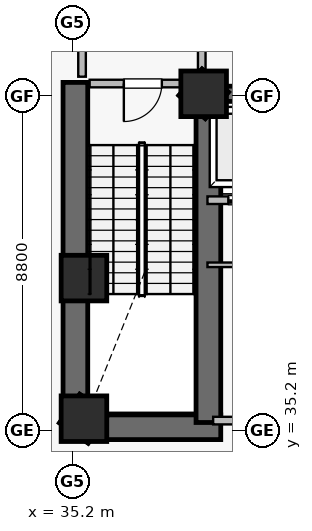
"""IFC4 building model, lengths in metres.
Left out: names, types, materials, properties, quantities, classifications, styles, units other than length and angle.
Written with IfcOpenShell. Run it as: python <this file> out.ifc"""

import sys

from ifc_helpers import new_model, si_unit, direction, frame, frame_2d, origin, origin_2d, place, context, subcontext, project, spatial, rectangle, extrude, element, fill, save


model = new_model("IFC4")
c1 = context("Model", 3, precision=1e-05, world=origin(), true_north=direction((0.0, 1.0)))
c2 = subcontext(c1, "Body", "Model", "MODEL_VIEW")
j1 = project(units=[si_unit("LENGTHUNIT", "METRE"), si_unit("PLANEANGLEUNIT", "RADIAN")], contexts=[c1])
p1 = place(None, origin())
s1 = spatial("IfcSite", under=j1, at=p1, CompositionType="ELEMENT")
p2 = place(p1, origin())
s2 = spatial("IfcBuilding", under=s1, at=p2, CompositionType="ELEMENT")
p3 = place(p2, frame((0.0, 0.0, 90.4)))
s3 = spatial("IfcBuildingStorey", under=s2, at=p3, CompositionType="ELEMENT", Elevation=90.4)
p4 = place(p3, frame((34.95, 35.275, 0.0), z_axis=(0.0, 0.0, 1.0), x_axis=(1.0, 0.0, 0.0)))
e1 = element("IfcWall", 1, at=p4, inside=s3, PredefinedType="SHEAR", context=c2, shape_type="SweptSolid", body=[
    extrude(rectangle(XDim=4.15, YDim=0.65, at=frame_2d((2.075, 0.0))), origin(), (0.0, 0.0, 1.0), 5.1),
])
p5 = place(p3, frame((35.275, 34.95, 0.0), z_axis=(0.0, 0.0, 1.0), x_axis=(0.0, 1.0, 0.0)))
e2 = element("IfcWall", 2, at=p5, inside=s3, PredefinedType="SHEAR", context=c2, shape_type="SweptSolid", body=[
    extrude(rectangle(XDim=9.4, YDim=0.65, at=frame_2d((4.7, 0.0))), origin(), (0.0, 0.0, 1.0), 5.1),
])
p6 = place(p3, frame((38.775, 35.4, 0.0), z_axis=(0.0, 0.0, 1.0), x_axis=(0.0, 1.0, 0.0)))
e3 = element("IfcWall", 3, at=p6, inside=s3, PredefinedType="SHEAR", context=c2, shape_type="SweptSolid", body=[
    extrude(rectangle(XDim=8.95, YDim=0.65, at=frame_2d((4.475, 0.0))), origin(), (0.0, 0.0, 1.0), 5.1),
])
p7 = place(p3, frame((38.75, 44.05, 0.0), z_axis=(0.0, 0.0, 1.0), x_axis=(1.0, 0.0, 0.0)))
e4 = element("IfcWall", 4, at=p7, inside=s3, PredefinedType="SHEAR", context=c2, shape_type="SweptSolid", body=[
    extrude(rectangle(XDim=4.2, YDim=0.4, at=frame_2d((2.1, 0.0))), origin(), (0.0, 0.0, 1.0), 5.1),
])
for number, where, z_axis, x_axis in (
    (5, (35.5, 35.5, 0.0), (0.0, 0.0, 1.0), (1.0, 0.0, 0.0)),
    (6, (38.65, 44.05, 0.0), (0.0, 0.0, 1.0), (1.0, 0.0, 0.0)),
    (7, (35.5, 39.2, 0.0), (0.0, 0.0, 1.0), (1.0, 0.0, 0.0)),
):
    element("IfcColumn", number, at=place(p3, frame(where, z_axis=z_axis, x_axis=x_axis)), inside=s3, PredefinedType="COLUMN", context=c2, shape_type="SweptSolid", body=[
        extrude(rectangle(XDim=1.2, YDim=1.2, at=origin_2d()), origin(), (0.0, 0.0, 1.0), 5.4),
    ])
p8 = place(p3, frame((38.9, 35.45, 0.0), z_axis=(0.0, 0.0, 1.0), x_axis=(1.0, 0.0, 0.0)))
e8 = element("IfcWall", 8, at=p8, inside=s3, PredefinedType="SOLIDWALL", context=c2, shape_type="SweptSolid", body=[
    extrude(rectangle(XDim=10.2, YDim=0.2, at=frame_2d((5.1, 0.0))), origin(), (0.0, 0.0, 1.0), 5.1),
])
p9 = place(p8, frame((4.6, 0.0, 0.0)))
e9 = element("IfcOpeningElement", 9, at=p9, cuts=e8, PredefinedType="OPENING", context=c2, shape_type="SweptSolid", body=[
    extrude(rectangle(XDim=1.0, YDim=2.15, at=frame_2d((0.5, 1.075))), frame((0.0, 0.11, 0.0), z_axis=(0.0, -1.0, 0.0), x_axis=(1.0, 0.0, 0.0)), (0.0, 0.0, 1.0), 0.22),
])
p10 = place(p3, frame((35.45, 44.5, 0.0), z_axis=(0.0, 0.0, 1.0), x_axis=(0.0, 1.0, 0.0)))
e10 = element("IfcWall", 10, at=p10, inside=s3, PredefinedType="SOLIDWALL", context=c2, shape_type="SweptSolid", body=[
    extrude(rectangle(XDim=7.92, YDim=0.2, at=frame_2d((3.96, 0.0))), origin(), (0.0, 0.0, 1.0), 5.1),
])
p11 = place(p10, frame((2.6, 0.0, 0.0)))
e11 = element("IfcOpeningElement", 11, at=p11, cuts=e10, PredefinedType="OPENING", context=c2, shape_type="SweptSolid", body=[
    extrude(rectangle(XDim=1.0, YDim=2.15, at=frame_2d((0.5, 1.075))), frame((0.0, 0.11, 0.0), z_axis=(0.0, -1.0, 0.0), x_axis=(1.0, 0.0, 0.0)), (0.0, 0.0, 1.0), 0.22),
])
p12 = place(p3, frame((38.6, 44.5, 0.0), z_axis=(0.0, 0.0, 1.0), x_axis=(0.0, 1.0, 0.0)))
e12 = element("IfcWall", 12, at=p12, inside=s3, PredefinedType="SOLIDWALL", context=c2, shape_type="SweptSolid", body=[
    extrude(rectangle(XDim=7.92, YDim=0.2, at=frame_2d((3.96, 0.0))), origin(), (0.0, 0.0, 1.0), 5.1),
])
p13 = place(p12, frame((3.425, 0.0, 0.0)))
e13 = element("IfcOpeningElement", 13, at=p13, cuts=e12, PredefinedType="OPENING", context=c2, shape_type="SweptSolid", body=[
    extrude(rectangle(XDim=0.95, YDim=2.15, at=frame_2d((0.475, 1.075))), frame((0.0, 0.11, 0.0), z_axis=(0.0, -1.0, 0.0), x_axis=(1.0, 0.0, 0.0)), (0.0, 0.0, 1.0), 0.22),
])
p14 = place(p3, frame((38.75, 41.25, 0.0), z_axis=(0.0, 0.0, 1.0), x_axis=(1.0, 0.0, 0.0)))
e14 = element("IfcWall", 14, at=p14, inside=s3, PredefinedType="SOLIDWALL", context=c2, shape_type="SweptSolid", body=[
    extrude(rectangle(XDim=4.33, YDim=0.2, at=frame_2d((2.165, 0.0))), origin(), (0.0, 0.0, 1.0), 5.1),
])
p15 = place(p14, frame((0.55, 0.0, 0.0)))
e15 = element("IfcOpeningElement", 15, at=p15, cuts=e14, PredefinedType="OPENING", context=c2, shape_type="SweptSolid", body=[
    extrude(rectangle(XDim=1.0, YDim=2.15, at=frame_2d((0.5, 1.075))), frame((0.0, 0.11, 0.0), z_axis=(0.0, -1.0, 0.0), x_axis=(1.0, 0.0, 0.0)), (0.0, 0.0, 1.0), 0.22),
])
p16 = place(p14, frame((2.75, 0.0, 0.0)))
e16 = element("IfcOpeningElement", 16, at=p16, cuts=e14, PredefinedType="OPENING", context=c2, shape_type="SweptSolid", body=[
    extrude(rectangle(XDim=1.0, YDim=2.15, at=frame_2d((0.5, 1.075))), frame((0.0, 0.11, 0.0), z_axis=(0.0, -1.0, 0.0), x_axis=(1.0, 0.0, 0.0)), (0.0, 0.0, 1.0), 0.22),
])
p17 = place(p3, frame((38.75, 39.55, 0.0), z_axis=(0.0, 0.0, 1.0), x_axis=(1.0, 0.0, 0.0)))
e17 = element("IfcWall", 17, at=p17, inside=s3, PredefinedType="PARTITIONING", context=c2, shape_type="SweptSolid", body=[
    extrude(rectangle(XDim=4.33, YDim=0.12, at=frame_2d((2.165, 0.0))), origin(), (0.0, 0.0, 1.0), 5.1),
])
p18 = place(p17, frame((1.69, 0.0, 0.0)))
e18 = element("IfcOpeningElement", 18, at=p18, cuts=e17, PredefinedType="OPENING", context=c2, shape_type="SweptSolid", body=[
    extrude(rectangle(XDim=0.92, YDim=2.1, at=frame_2d((0.46, 1.05))), frame((0.0, 0.07, 0.0), z_axis=(0.0, -1.0, 0.0), x_axis=(1.0, 0.0, 0.0)), (0.0, 0.0, 1.0), 0.14),
])
p19 = place(p3, frame((35.65, 44.32, 0.0), z_axis=(0.0, 0.0, 1.0), x_axis=(1.0, 0.0, 0.0)))
e19 = element("IfcWall", 19, at=p19, inside=s3, PredefinedType="SOLIDWALL", context=c2, shape_type="SweptSolid", body=[
    extrude(rectangle(XDim=2.8, YDim=0.2, at=frame_2d((1.4, 0.0))), origin(), (0.0, 0.0, 1.0), 5.1),
])
p20 = place(p19, frame((0.9, 0.0, 0.0)))
e20 = element("IfcOpeningElement", 20, at=p20, cuts=e19, PredefinedType="OPENING", context=c2, shape_type="SweptSolid", body=[
    extrude(rectangle(XDim=1.0, YDim=2.15, at=frame_2d((0.5, 1.075))), frame((0.0, 0.11, 0.0), z_axis=(0.0, -1.0, 0.0), x_axis=(1.0, 0.0, 0.0)), (0.0, 0.0, 1.0), 0.22),
])
p21 = place(p20, frame((1.0, 0.0, 0.0), z_axis=(0.0, 0.0, 1.0), x_axis=(-1.0, 0.0, 0.0)))
e21 = element("IfcDoor", 21, at=p21, inside=s3, OperationType="SINGLE_SWING_LEFT", PredefinedType="DOOR", context=c2, shape_type="SweptSolid", body=[
    extrude(rectangle(XDim=1.0, YDim=2.15, at=frame_2d((0.5, 1.075))), frame((0.0, 0.025, 0.0), z_axis=(0.0, -1.0, 0.0), x_axis=(1.0, 0.0, 0.0)), (0.0, 0.0, 1.0), 0.05),
])
fill(e20, e21)
p22 = place(p15, frame((1.0, 0.0, 0.0), z_axis=(0.0, 0.0, 1.0), x_axis=(-1.0, 0.0, 0.0)))
e22 = element("IfcDoor", 22, at=p22, inside=s3, OperationType="SLIDING_TO_LEFT", PredefinedType="DOOR", context=c2, shape_type="SweptSolid", body=[
    extrude(rectangle(XDim=1.0, YDim=2.15, at=frame_2d((0.5, 1.075))), frame((0.0, 0.025, 0.0), z_axis=(0.0, -1.0, 0.0), x_axis=(1.0, 0.0, 0.0)), (0.0, 0.0, 1.0), 0.05),
])
fill(e15, e22)
save(model, sys.argv[1])
